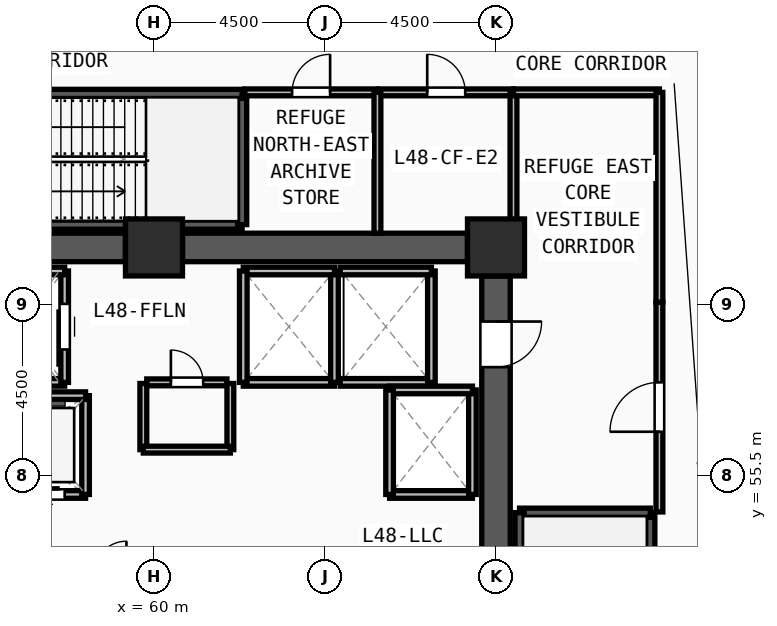
"""IFC4 building model, lengths in metres.
Left out: names, types, materials, properties, quantities, classifications, styles, units other than length and angle.
Written with IfcOpenShell. Run it as: python <this file> out.ifc"""

import sys

from ifc_helpers import new_model, si_unit, direction, frame, frame_2d, origin, origin_2d, place, context, subcontext, project, spatial, rectangle, extrude, source, transform, mapped, element, fill, save


model = new_model("IFC4")
c1 = context("Model", 3, precision=1e-05, world=origin(), true_north=direction((0.0, 1.0)))
c2 = subcontext(c1, "Body", "Model", "MODEL_VIEW")
j1 = project(units=[si_unit("LENGTHUNIT", "METRE"), si_unit("PLANEANGLEUNIT", "RADIAN")], contexts=[c1])
p1 = place(None, origin())
s1 = spatial("IfcSite", under=j1, at=p1, CompositionType="ELEMENT")
p2 = place(p1, origin())
s2 = spatial("IfcBuilding", under=s1, at=p2, CompositionType="ELEMENT")
p3 = place(p2, frame((0.0, 0.0, 185.25)))
s3 = spatial("IfcBuildingStorey", under=s2, at=p3, CompositionType="ELEMENT", Elevation=185.25)
m1 = source(origin(), c2, "Body", "SweptSolid", [
    extrude(rectangle(XDim=1.5, YDim=1.5, at=origin_2d()), origin(), (0.0, 0.0, 1.0), 4.5),
])
for number, where, z_axis, x_axis in (
    (1, (69.0, 61.5, 0.0), (0.0, 0.0, 1.0), (1.0, 0.0, 0.0)),
    (2, (60.0, 61.5, 0.0), (0.0, 0.0, 1.0), (1.0, 0.0, 0.0)),
):
    element("IfcColumn", number, at=place(p3, frame(where, z_axis=z_axis, x_axis=x_axis)), inside=s3, PredefinedType="COLUMN", context=c2, shape_type="MappedRepresentation", body=[
        mapped(m1, transform((0.0, 0.0, 0.0), x_axis=(1.0, 0.0, 0.0), y_axis=(0.0, 1.0, 0.0), z_axis=(0.0, 0.0, 1.0), scale=1.0)),
    ])
for number, where, z_axis, x_axis in (
    (3, (51.75, 61.5, 0.0), (0.0, 0.0, 1.0), (1.0, 0.0, 0.0)),
    (4, (60.75, 61.5, 0.0), (0.0, 0.0, 1.0), (1.0, 0.0, 0.0)),
):
    element("IfcWall", number, at=place(p3, frame(where, z_axis=z_axis, x_axis=x_axis)), inside=s3, PredefinedType="SHEAR", context=c2, shape_type="SweptSolid", body=[
        extrude(rectangle(XDim=7.5, YDim=0.75, at=frame_2d((3.75, 0.0))), origin(), (0.0, 0.0, 1.0), 4.22),
    ])
p4 = place(p3, frame((69.0, 60.75, 0.0), z_axis=(0.0, 0.0, 1.0), x_axis=(0.0, -1.0, 0.0)))
e5 = element("IfcWall", 5, at=p4, inside=s3, PredefinedType="SHEAR", context=c2, shape_type="SweptSolid", body=[
    extrude(rectangle(XDim=13.5, YDim=0.75, at=frame_2d((6.75, 0.0))), origin(), (0.0, 0.0, 1.0), 4.22),
])
m2 = source(origin(), c2, "Body", "SweptSolid", [
    extrude(rectangle(XDim=1.2, YDim=2.2, at=frame_2d((0.6, 1.1))), frame((0.0, 0.385, 0.0), z_axis=(0.0, -1.0, 0.0), x_axis=(1.0, 0.0, 0.0)), (0.0, 0.0, 1.0), 0.77),
])
p5 = place(p4, frame((1.2, 0.0, 0.0)))
e6 = element("IfcOpeningElement", 6, at=p5, cuts=e5, PredefinedType="OPENING", context=c2, shape_type="MappedRepresentation", body=[
    mapped(m2, transform((0.0, 0.0, 0.0), x_axis=(1.0, 0.0, 0.0), y_axis=(0.0, 1.0, 0.0), z_axis=(0.0, 0.0, 1.0), scale=1.0)),
])
p6 = place(p3, frame((73.06, 46.7, 0.0), z_axis=(0.0, 0.0, 1.0), x_axis=(0.0, 1.0, 0.0)))
e7 = element("IfcWall", 7, at=p6, inside=s3, PredefinedType="SOLIDWALL", context=c2, shape_type="SweptSolid", body=[
    extrude(rectangle(XDim=7.82, YDim=0.24, at=frame_2d((3.91, 0.0))), origin(), (0.0, 0.0, 1.0), 4.22),
])
m3 = source(origin(), c2, "Body", "SweptSolid", [
    extrude(rectangle(XDim=1.2, YDim=2.2, at=frame_2d((0.6, 1.1))), frame((0.0, 0.13, 0.0), z_axis=(0.0, -1.0, 0.0), x_axis=(1.0, 0.0, 0.0)), (0.0, 0.0, 1.0), 0.26),
])
p7 = place(p6, frame((0.32, 0.0, 0.0)))
e8 = element("IfcOpeningElement", 8, at=p7, cuts=e7, PredefinedType="OPENING", context=c2, shape_type="MappedRepresentation", body=[
    mapped(m3, transform((0.0, 0.0, 0.0), x_axis=(1.0, 0.0, 0.0), y_axis=(0.0, 1.0, 0.0), z_axis=(0.0, 0.0, 1.0), scale=1.0)),
])
p8 = place(p3, frame((73.06, 54.52, 0.0), z_axis=(0.0, 0.0, 1.0), x_axis=(-1.0, 0.0, 0.0)))
e9 = element("IfcWall", 9, at=p8, inside=s3, PredefinedType="SOLIDWALL", context=c2, shape_type="SweptSolid", body=[
    extrude(rectangle(XDim=3.44, YDim=0.24, at=frame_2d((1.72, 0.0))), origin(), (0.0, 0.0, 1.0), 4.22),
])
for number, where, z_axis, x_axis in (
    (10, (69.62, 54.52, 0.0), (0.0, 0.0, 1.0), (0.0, -1.0, 0.0)),
    (11, (54.5, 62.1, 0.0), (0.0, 0.0, 1.0), (1.0, 0.0, 0.0)),
):
    element("IfcWall", number, at=place(p3, frame(where, z_axis=z_axis, x_axis=x_axis)), inside=s3, PredefinedType="SOLIDWALL", context=c2, shape_type="SweptSolid", body=[
        extrude(rectangle(XDim=7.82, YDim=0.24, at=frame_2d((3.91, 0.0))), origin(), (0.0, 0.0, 1.0), 4.22),
    ])
p9 = place(p3, frame((62.32, 62.1, 0.0), z_axis=(0.0, 0.0, 1.0), x_axis=(0.0, 1.0, 0.0)))
e12 = element("IfcWall", 12, at=p9, inside=s3, PredefinedType="SOLIDWALL", context=c2, shape_type="SweptSolid", body=[
    extrude(rectangle(XDim=3.44, YDim=0.24, at=frame_2d((1.72, 0.0))), origin(), (0.0, 0.0, 1.0), 4.22),
])
p10 = place(p3, frame((62.32, 65.54, 0.0), z_axis=(0.0, 0.0, 1.0), x_axis=(-1.0, 0.0, 0.0)))
e13 = element("IfcWall", 13, at=p10, inside=s3, PredefinedType="SOLIDWALL", context=c2, shape_type="SweptSolid", body=[
    extrude(rectangle(XDim=7.82, YDim=0.24, at=frame_2d((3.91, 0.0))), origin(), (0.0, 0.0, 1.0), 4.22),
])
p11 = place(p10, frame((6.3, 0.0, 0.0)))
e14 = element("IfcOpeningElement", 14, at=p11, cuts=e13, PredefinedType="OPENING", context=c2, shape_type="MappedRepresentation", body=[
    mapped(m3, transform((0.0, 0.0, 0.0), x_axis=(1.0, 0.0, 0.0), y_axis=(0.0, 1.0, 0.0), z_axis=(0.0, 0.0, 1.0), scale=1.0)),
])
p12 = place(p3, frame((55.25, 57.95, 0.0), z_axis=(0.0, 0.0, 1.0), x_axis=(1.0, 0.0, 0.0)))
e15 = element("IfcWall", 15, at=p12, inside=s3, PredefinedType="SOLIDWALL", context=c2, shape_type="SweptSolid", body=[
    extrude(rectangle(XDim=2.4, YDim=0.2, at=frame_2d((1.2, 0.0))), origin(), (0.0, 0.0, 1.0), 4.22),
])
p13 = place(p3, frame((57.65, 57.95, 0.0), z_axis=(0.0, 0.0, 1.0), x_axis=(0.0, 1.0, 0.0)))
e16 = element("IfcWall", 16, at=p13, inside=s3, PredefinedType="SOLIDWALL", context=c2, shape_type="SweptSolid", body=[
    extrude(rectangle(XDim=2.93, YDim=0.2, at=frame_2d((1.465, 0.0))), origin(), (0.0, 0.0, 1.0), 4.22),
])
m4 = source(origin(), c2, "Body", "SweptSolid", [
    extrude(rectangle(XDim=1.2, YDim=2.3, at=frame_2d((0.6, 1.15))), frame((0.0, 0.11, 0.0), z_axis=(0.0, -1.0, 0.0), x_axis=(1.0, 0.0, 0.0)), (0.0, 0.0, 1.0), 0.22),
])
p14 = place(p13, frame((0.865, 0.0, 0.0)))
e17 = element("IfcOpeningElement", 17, at=p14, cuts=e16, PredefinedType="OPENING", context=c2, shape_type="MappedRepresentation", body=[
    mapped(m4, transform((0.0, 0.0, 0.0), x_axis=(1.0, 0.0, 0.0), y_axis=(0.0, 1.0, 0.0), z_axis=(0.0, 0.0, 1.0), scale=1.0)),
])
for number, where, z_axis, x_axis in (
    (18, (57.65, 60.88, 0.0), (0.0, 0.0, 1.0), (-1.0, 0.0, 0.0)),
    (19, (62.35, 57.95, 0.0), (0.0, 0.0, 1.0), (1.0, 0.0, 0.0)),
):
    element("IfcWall", number, at=place(p3, frame(where, z_axis=z_axis, x_axis=x_axis)), inside=s3, PredefinedType="SOLIDWALL", context=c2, shape_type="SweptSolid", body=[
        extrude(rectangle(XDim=2.4, YDim=0.2, at=frame_2d((1.2, 0.0))), origin(), (0.0, 0.0, 1.0), 4.22),
    ])
p15 = place(p3, frame((64.75, 57.95, 0.0), z_axis=(0.0, 0.0, 1.0), x_axis=(0.0, 1.0, 0.0)))
e20 = element("IfcWall", 20, at=p15, inside=s3, PredefinedType="SOLIDWALL", context=c2, shape_type="SweptSolid", body=[
    extrude(rectangle(XDim=2.93, YDim=0.2, at=frame_2d((1.465, 0.0))), origin(), (0.0, 0.0, 1.0), 4.22),
])
p16 = place(p3, frame((64.75, 60.88, 0.0), z_axis=(0.0, 0.0, 1.0), x_axis=(-1.0, 0.0, 0.0)))
e21 = element("IfcWall", 21, at=p16, inside=s3, PredefinedType="SOLIDWALL", context=c2, shape_type="SweptSolid", body=[
    extrude(rectangle(XDim=2.4, YDim=0.2, at=frame_2d((1.2, 0.0))), origin(), (0.0, 0.0, 1.0), 4.22),
])
p17 = place(p3, frame((62.35, 60.88, 0.0), z_axis=(0.0, 0.0, 1.0), x_axis=(0.0, -1.0, 0.0)))
e22 = element("IfcWall", 22, at=p17, inside=s3, PredefinedType="SOLIDWALL", context=c2, shape_type="SweptSolid", body=[
    extrude(rectangle(XDim=2.93, YDim=0.2, at=frame_2d((1.465, 0.0))), origin(), (0.0, 0.0, 1.0), 4.22),
])
p18 = place(p3, frame((64.9, 57.95, 0.0), z_axis=(0.0, 0.0, 1.0), x_axis=(1.0, 0.0, 0.0)))
e23 = element("IfcWall", 23, at=p18, inside=s3, PredefinedType="SOLIDWALL", context=c2, shape_type="SweptSolid", body=[
    extrude(rectangle(XDim=2.4, YDim=0.2, at=frame_2d((1.2, 0.0))), origin(), (0.0, 0.0, 1.0), 4.22),
])
p19 = place(p3, frame((67.3, 57.95, 0.0), z_axis=(0.0, 0.0, 1.0), x_axis=(0.0, 1.0, 0.0)))
e24 = element("IfcWall", 24, at=p19, inside=s3, PredefinedType="SOLIDWALL", context=c2, shape_type="SweptSolid", body=[
    extrude(rectangle(XDim=2.93, YDim=0.2, at=frame_2d((1.465, 0.0))), origin(), (0.0, 0.0, 1.0), 4.22),
])
p20 = place(p3, frame((67.3, 60.88, 0.0), z_axis=(0.0, 0.0, 1.0), x_axis=(-1.0, 0.0, 0.0)))
e25 = element("IfcWall", 25, at=p20, inside=s3, PredefinedType="SOLIDWALL", context=c2, shape_type="SweptSolid", body=[
    extrude(rectangle(XDim=2.4, YDim=0.2, at=frame_2d((1.2, 0.0))), origin(), (0.0, 0.0, 1.0), 4.22),
])
p21 = place(p3, frame((66.2, 55.0, 0.0), z_axis=(0.0, 0.0, 1.0), x_axis=(1.0, 0.0, 0.0)))
e26 = element("IfcWall", 26, at=p21, inside=s3, PredefinedType="SOLIDWALL", context=c2, shape_type="SweptSolid", body=[
    extrude(rectangle(XDim=2.18, YDim=0.2, at=frame_2d((1.09, 0.0))), origin(), (0.0, 0.0, 1.0), 4.22),
])
p22 = place(p3, frame((68.38, 55.0, 0.0), z_axis=(0.0, 0.0, 1.0), x_axis=(0.0, 1.0, 0.0)))
e27 = element("IfcWall", 27, at=p22, inside=s3, PredefinedType="SOLIDWALL", context=c2, shape_type="SweptSolid", body=[
    extrude(rectangle(XDim=2.75, YDim=0.2, at=frame_2d((1.375, 0.0))), origin(), (0.0, 0.0, 1.0), 4.22),
])
p23 = place(p3, frame((68.38, 57.75, 0.0), z_axis=(0.0, 0.0, 1.0), x_axis=(-1.0, 0.0, 0.0)))
e28 = element("IfcWall", 28, at=p23, inside=s3, PredefinedType="SOLIDWALL", context=c2, shape_type="SweptSolid", body=[
    extrude(rectangle(XDim=2.18, YDim=0.2, at=frame_2d((1.09, 0.0))), origin(), (0.0, 0.0, 1.0), 4.22),
])
p24 = place(p3, frame((66.2, 57.75, 0.0), z_axis=(0.0, 0.0, 1.0), x_axis=(0.0, -1.0, 0.0)))
e29 = element("IfcWall", 29, at=p24, inside=s3, PredefinedType="SOLIDWALL", context=c2, shape_type="SweptSolid", body=[
    extrude(rectangle(XDim=2.75, YDim=0.2, at=frame_2d((1.375, 0.0))), origin(), (0.0, 0.0, 1.0), 4.22),
])
p25 = place(p3, frame((56.0, 55.0, 0.0), z_axis=(0.0, 0.0, 1.0), x_axis=(1.0, 0.0, 0.0)))
e30 = element("IfcWall", 30, at=p25, inside=s3, PredefinedType="SOLIDWALL", context=c2, shape_type="SweptSolid", body=[
    extrude(rectangle(XDim=2.2, YDim=0.2, at=frame_2d((1.1, 0.0))), origin(), (0.0, 0.0, 1.0), 4.22),
])
m5 = source(origin(), c2, "Body", "SweptSolid", [
    extrude(rectangle(XDim=1.1, YDim=2.2, at=frame_2d((0.55, 1.1))), frame((0.0, 0.11, 0.0), z_axis=(0.0, -1.0, 0.0), x_axis=(1.0, 0.0, 0.0)), (0.0, 0.0, 1.0), 0.22),
])
p26 = place(p25, frame((0.55, 0.0, 0.0)))
e31 = element("IfcOpeningElement", 31, at=p26, cuts=e30, PredefinedType="OPENING", context=c2, shape_type="MappedRepresentation", body=[
    mapped(m5, transform((0.0, 0.0, 0.0), x_axis=(1.0, 0.0, 0.0), y_axis=(0.0, 1.0, 0.0), z_axis=(0.0, 0.0, 1.0), scale=1.0)),
])
p27 = place(p3, frame((58.2, 55.0, 0.0), z_axis=(0.0, 0.0, 1.0), x_axis=(0.0, 1.0, 0.0)))
e32 = element("IfcWall", 32, at=p27, inside=s3, PredefinedType="SOLIDWALL", context=c2, shape_type="SweptSolid", body=[
    extrude(rectangle(XDim=2.6, YDim=0.2, at=frame_2d((1.3, 0.0))), origin(), (0.0, 0.0, 1.0), 4.22),
])
p28 = place(p3, frame((58.2, 57.6, 0.0), z_axis=(0.0, 0.0, 1.0), x_axis=(-1.0, 0.0, 0.0)))
e33 = element("IfcWall", 33, at=p28, inside=s3, PredefinedType="SOLIDWALL", context=c2, shape_type="SweptSolid", body=[
    extrude(rectangle(XDim=2.2, YDim=0.2, at=frame_2d((1.1, 0.0))), origin(), (0.0, 0.0, 1.0), 4.22),
])
p29 = place(p3, frame((59.81, 57.95, 0.0), z_axis=(0.0, 0.0, 1.0), x_axis=(1.0, 0.0, 0.0)))
e34 = element("IfcWall", 34, at=p29, inside=s3, PredefinedType="PARTITIONING", context=c2, shape_type="SweptSolid", body=[
    extrude(rectangle(XDim=2.11, YDim=0.18, at=frame_2d((1.055, 0.0))), origin(), (0.0, 0.0, 1.0), 4.22),
])
m6 = source(origin(), c2, "Body", "SweptSolid", [
    extrude(rectangle(XDim=0.85, YDim=2.1, at=frame_2d((0.425, 1.05))), frame((0.0, 0.1, 0.0), z_axis=(0.0, -1.0, 0.0), x_axis=(1.0, 0.0, 0.0)), (0.0, 0.0, 1.0), 0.2),
])
p30 = place(p29, frame((0.635, 0.0, 0.0)))
e35 = element("IfcOpeningElement", 35, at=p30, cuts=e34, PredefinedType="OPENING", context=c2, shape_type="MappedRepresentation", body=[
    mapped(m6, transform((0.0, 0.0, 0.0), x_axis=(1.0, 0.0, 0.0), y_axis=(0.0, 1.0, 0.0), z_axis=(0.0, 0.0, 1.0), scale=1.0)),
])
p31 = place(p3, frame((62.39, 65.58, 0.0), z_axis=(0.0, 0.0, 1.0), x_axis=(1.0, 0.0, 0.0)))
e36 = element("IfcWall", 36, at=p31, inside=s3, PredefinedType="PARTITIONING", context=c2, shape_type="SweptSolid", body=[
    extrude(rectangle(XDim=3.49, YDim=0.18, at=frame_2d((1.745, 0.0))), origin(), (0.0, 0.0, 1.0), 4.22),
])
m7 = source(origin(), c2, "Body", "SweptSolid", [
    extrude(rectangle(XDim=1.0, YDim=2.2, at=frame_2d((0.5, 1.1))), frame((0.0, 0.1, 0.0), z_axis=(0.0, -1.0, 0.0), x_axis=(1.0, 0.0, 0.0)), (0.0, 0.0, 1.0), 0.2),
])
p32 = place(p31, frame((1.245, 0.0, 0.0)))
e37 = element("IfcOpeningElement", 37, at=p32, cuts=e36, PredefinedType="OPENING", context=c2, shape_type="MappedRepresentation", body=[
    mapped(m7, transform((0.0, 0.0, 0.0), x_axis=(1.0, 0.0, 0.0), y_axis=(0.0, 1.0, 0.0), z_axis=(0.0, 0.0, 1.0), scale=1.0)),
])
p33 = place(p3, frame((65.92, 65.58, 0.0), z_axis=(0.0, 0.0, 1.0), x_axis=(1.0, 0.0, 0.0)))
e38 = element("IfcWall", 38, at=p33, inside=s3, PredefinedType="PARTITIONING", context=c2, shape_type="SweptSolid", body=[
    extrude(rectangle(XDim=3.54, YDim=0.18, at=frame_2d((1.77, 0.0))), origin(), (0.0, 0.0, 1.0), 4.22),
])
p34 = place(p33, frame((1.27, 0.0, 0.0)))
e39 = element("IfcOpeningElement", 39, at=p34, cuts=e38, PredefinedType="OPENING", context=c2, shape_type="MappedRepresentation", body=[
    mapped(m7, transform((0.0, 0.0, 0.0), x_axis=(1.0, 0.0, 0.0), y_axis=(0.0, 1.0, 0.0), z_axis=(0.0, 0.0, 1.0), scale=1.0)),
])
p35 = place(p3, frame((73.3, 54.54, 0.0), z_axis=(0.0, 0.0, 1.0), x_axis=(0.0, 1.0, 0.0)))
e40 = element("IfcWall", 40, at=p35, inside=s3, PredefinedType="PARTITIONING", context=c2, shape_type="SweptSolid", body=[
    extrude(rectangle(XDim=5.52, YDim=0.18, at=frame_2d((2.76, 0.0))), origin(), (0.0, 0.0, 1.0), 4.22),
])
m8 = source(origin(), c2, "Body", "SweptSolid", [
    extrude(rectangle(XDim=1.3, YDim=2.2, at=frame_2d((0.65, 1.1))), frame((0.0, 0.1, 0.0), z_axis=(0.0, -1.0, 0.0), x_axis=(1.0, 0.0, 0.0)), (0.0, 0.0, 1.0), 0.2),
])
p36 = place(p35, frame((2.11, 0.0, 0.0)))
e41 = element("IfcOpeningElement", 41, at=p36, cuts=e40, PredefinedType="OPENING", context=c2, shape_type="MappedRepresentation", body=[
    mapped(m8, transform((0.0, 0.0, 0.0), x_axis=(1.0, 0.0, 0.0), y_axis=(0.0, 1.0, 0.0), z_axis=(0.0, 0.0, 1.0), scale=1.0)),
])
for number, where, z_axis, x_axis in (
    (42, (59.72, 56.18, 0.0), (0.0, 0.0, 1.0), (0.0, 1.0, 0.0)),
    (43, (62.01, 56.18, 0.0), (0.0, 0.0, 1.0), (0.0, 1.0, 0.0)),
):
    element("IfcWall", number, at=place(p3, frame(where, z_axis=z_axis, x_axis=x_axis)), inside=s3, PredefinedType="PARTITIONING", context=c2, shape_type="SweptSolid", body=[
        extrude(rectangle(XDim=1.74, YDim=0.18, at=frame_2d((0.87, 0.0))), origin(), (0.0, 0.0, 1.0), 4.22),
    ])
p37 = place(p3, frame((59.72, 56.18, 0.0), z_axis=(0.0, 0.0, 1.0), x_axis=(1.0, 0.0, 0.0)))
e44 = element("IfcWall", 44, at=p37, inside=s3, PredefinedType="PARTITIONING", context=c2, shape_type="SweptSolid", body=[
    extrude(rectangle(XDim=2.29, YDim=0.18, at=frame_2d((1.145, 0.0))), origin(), (0.0, 0.0, 1.0), 4.22),
])
p38 = place(p3, frame((65.88, 61.875, 0.0), z_axis=(0.0, 0.0, 1.0), x_axis=(0.0, 1.0, 0.0)))
e45 = element("IfcWall", 45, at=p38, inside=s3, PredefinedType="PARTITIONING", context=c2, shape_type="SweptSolid", body=[
    extrude(rectangle(XDim=3.705, YDim=0.18, at=frame_2d((1.853, 0.0))), origin(), (0.0, 0.0, 1.0), 4.22),
])
p39 = place(p3, frame((69.46, 61.95, 0.0), z_axis=(0.0, 0.0, 1.0), x_axis=(0.0, 1.0, 0.0)))
e46 = element("IfcWall", 46, at=p39, inside=s3, PredefinedType="PARTITIONING", context=c2, shape_type="SweptSolid", body=[
    extrude(rectangle(XDim=3.63, YDim=0.18, at=frame_2d((1.815, 0.0))), origin(), (0.0, 0.0, 1.0), 4.22),
])
p40 = place(p3, frame((69.46, 65.58, 0.0), z_axis=(0.0, 0.0, 1.0), x_axis=(1.0, 0.0, 0.0)))
e47 = element("IfcWall", 47, at=p40, inside=s3, PredefinedType="PARTITIONING", context=c2, shape_type="SweptSolid", body=[
    extrude(rectangle(XDim=3.84, YDim=0.18, at=frame_2d((1.92, 0.0))), origin(), (0.0, 0.0, 1.0), 4.22),
])
p41 = place(p3, frame((73.3, 60.06, 0.0), z_axis=(0.0, 0.0, 1.0), x_axis=(0.0, 1.0, 0.0)))
e48 = element("IfcWall", 48, at=p41, inside=s3, PredefinedType="PARTITIONING", context=c2, shape_type="SweptSolid", body=[
    extrude(rectangle(XDim=5.52, YDim=0.18, at=frame_2d((2.76, 0.0))), origin(), (0.0, 0.0, 1.0), 4.22),
])
m9 = source(origin(), c2, "Body", "SweptSolid", [
    extrude(rectangle(XDim=1.2, YDim=2.2, at=frame_2d((0.6, 1.1))), frame((0.0, 0.025, 0.0), z_axis=(0.0, -1.0, 0.0), x_axis=(1.0, 0.0, 0.0)), (0.0, 0.0, 1.0), 0.05),
])
p42 = place(p5, origin())
e49 = element("IfcDoor", 49, at=p42, inside=s3, OperationType="SINGLE_SWING_LEFT", PredefinedType="DOOR", context=c2, shape_type="MappedRepresentation", body=[
    mapped(m9, transform((0.0, 0.0, 0.0), x_axis=(1.0, 0.0, 0.0), y_axis=(0.0, 1.0, 0.0), z_axis=(0.0, 0.0, 1.0), scale=1.0)),
])
fill(e6, e49)
m10 = source(origin(), c2, "Body", "SweptSolid", [
    extrude(rectangle(XDim=1.2, YDim=2.3, at=frame_2d((0.6, 1.15))), frame((0.0, 0.025, 0.0), z_axis=(0.0, -1.0, 0.0), x_axis=(1.0, 0.0, 0.0)), (0.0, 0.0, 1.0), 0.05),
])
p43 = place(p14, origin())
e50 = element("IfcDoor", 50, at=p43, inside=s3, OperationType="SLIDING_TO_LEFT", PredefinedType="DOOR", context=c2, shape_type="MappedRepresentation", body=[
    mapped(m10, transform((0.0, 0.0, 0.0), x_axis=(1.0, 0.0, 0.0), y_axis=(0.0, 1.0, 0.0), z_axis=(0.0, 0.0, 1.0), scale=1.0)),
])
fill(e17, e50)
m11 = source(origin(), c2, "Body", "SweptSolid", [
    extrude(rectangle(XDim=1.1, YDim=2.2, at=frame_2d((0.55, 1.1))), frame((0.0, 0.025, 0.0), z_axis=(0.0, -1.0, 0.0), x_axis=(1.0, 0.0, 0.0)), (0.0, 0.0, 1.0), 0.05),
])
p44 = place(p26, origin())
e51 = element("IfcDoor", 51, at=p44, inside=s3, OperationType="SLIDING_TO_LEFT", PredefinedType="DOOR", context=c2, shape_type="MappedRepresentation", body=[
    mapped(m11, transform((0.0, 0.0, 0.0), x_axis=(1.0, 0.0, 0.0), y_axis=(0.0, 1.0, 0.0), z_axis=(0.0, 0.0, 1.0), scale=1.0)),
])
fill(e31, e51)
m12 = source(origin(), c2, "Body", "SweptSolid", [
    extrude(rectangle(XDim=0.85, YDim=2.1, at=frame_2d((0.425, 1.05))), frame((0.0, 0.025, 0.0), z_axis=(0.0, -1.0, 0.0), x_axis=(1.0, 0.0, 0.0)), (0.0, 0.0, 1.0), 0.05),
])
p45 = place(p30, origin())
e52 = element("IfcDoor", 52, at=p45, inside=s3, OperationType="SINGLE_SWING_LEFT", PredefinedType="DOOR", context=c2, shape_type="MappedRepresentation", body=[
    mapped(m12, transform((0.0, 0.0, 0.0), x_axis=(1.0, 0.0, 0.0), y_axis=(0.0, 1.0, 0.0), z_axis=(0.0, 0.0, 1.0), scale=1.0)),
])
fill(e35, e52)
m13 = source(origin(), c2, "Body", "SweptSolid", [
    extrude(rectangle(XDim=1.0, YDim=2.2, at=frame_2d((0.5, 1.1))), frame((0.0, 0.025, 0.0), z_axis=(0.0, -1.0, 0.0), x_axis=(1.0, 0.0, 0.0)), (0.0, 0.0, 1.0), 0.05),
])
p46 = place(p32, origin())
e53 = element("IfcDoor", 53, at=p46, inside=s3, OperationType="SINGLE_SWING_RIGHT", PredefinedType="DOOR", context=c2, shape_type="MappedRepresentation", body=[
    mapped(m13, transform((0.0, 0.0, 0.0), x_axis=(1.0, 0.0, 0.0), y_axis=(0.0, 1.0, 0.0), z_axis=(0.0, 0.0, 1.0), scale=1.0)),
])
fill(e37, e53)
p47 = place(p34, origin())
e54 = element("IfcDoor", 54, at=p47, inside=s3, OperationType="SINGLE_SWING_LEFT", PredefinedType="DOOR", context=c2, shape_type="MappedRepresentation", body=[
    mapped(m13, transform((0.0, 0.0, 0.0), x_axis=(1.0, 0.0, 0.0), y_axis=(0.0, 1.0, 0.0), z_axis=(0.0, 0.0, 1.0), scale=1.0)),
])
fill(e39, e54)
m14 = source(origin(), c2, "Body", "SweptSolid", [
    extrude(rectangle(XDim=1.3, YDim=2.2, at=frame_2d((0.65, 1.1))), frame((0.0, 0.025, 0.0), z_axis=(0.0, -1.0, 0.0), x_axis=(1.0, 0.0, 0.0)), (0.0, 0.0, 1.0), 0.05),
])
p48 = place(p36, origin())
e55 = element("IfcDoor", 55, at=p48, inside=s3, OperationType="SINGLE_SWING_LEFT", PredefinedType="DOOR", context=c2, shape_type="MappedRepresentation", body=[
    mapped(m14, transform((0.0, 0.0, 0.0), x_axis=(1.0, 0.0, 0.0), y_axis=(0.0, 1.0, 0.0), z_axis=(0.0, 0.0, 1.0), scale=1.0)),
])
fill(e41, e55)
save(model, sys.argv[1])
